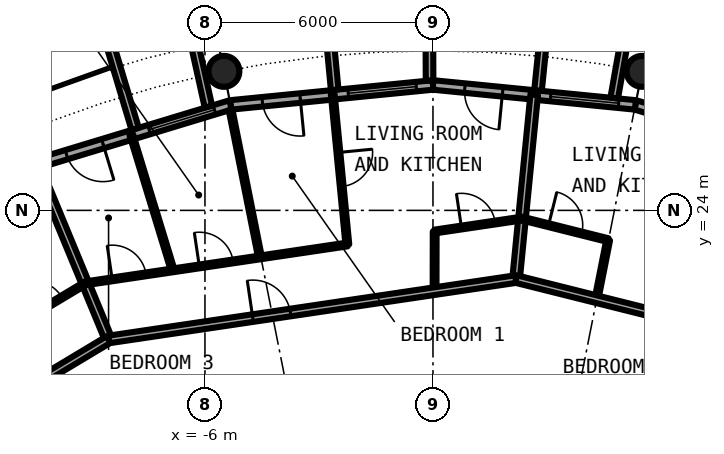
"""IFC4 building model, lengths in metres.
Left out: names, types, materials, properties, quantities, classifications, styles, units other than length and angle.
Written with IfcOpenShell. Run it as: python <this file> out.ifc"""

import sys

from ifc_helpers import new_model, si_unit, direction, frame, frame_2d, origin, origin_2d, place, context, subcontext, project, spatial, rectangle, hollow_circle, extrude, element, fill, save


model = new_model("IFC4")
c1 = context("Model", 3, precision=1e-05, world=origin(), true_north=direction((0.0, 1.0)))
c2 = subcontext(c1, "Body", "Model", "MODEL_VIEW")
j1 = project(units=[si_unit("LENGTHUNIT", "METRE"), si_unit("PLANEANGLEUNIT", "RADIAN")], contexts=[c1])
p1 = place(None, origin())
s1 = spatial("IfcSite", under=j1, at=p1, CompositionType="ELEMENT")
p2 = place(p1, origin())
s2 = spatial("IfcBuilding", under=s1, at=p2, CompositionType="ELEMENT")
p3 = place(p2, frame((0.0, 0.0, 145.2)))
s3 = spatial("IfcBuildingStorey", under=s2, at=p3, CompositionType="ELEMENT", Elevation=145.2)
for number, where, z_axis, x_axis in (
    (1, (5.501, 27.658, 0.0), (0.0, 0.0, 1.0), (1.0, 0.0, 0.0)),
    (2, (-5.501, 27.658, 0.0), (0.0, 0.0, 1.0), (1.0, 0.0, 0.0)),
):
    element("IfcColumn", number, at=place(p3, frame(where, z_axis=z_axis, x_axis=x_axis)), inside=s3, PredefinedType="COLUMN", context=c2, shape_type="SweptSolid", body=[
        extrude(hollow_circle(Radius=0.406, WallThickness=0.04, at=origin_2d()), origin(), (0.0, 0.0, 1.0), 3.05),
    ])
p4 = place(p3, frame((10.447, 25.222, 0.0), z_axis=(0.0, 0.0, 1.0), x_axis=(-0.956965678721, 0.290201119486, 0.0)))
e3 = element("IfcWall", 3, at=p4, inside=s3, PredefinedType="SOLIDWALL", context=c2, shape_type="SweptSolid", body=[
    extrude(rectangle(XDim=5.351, YDim=0.25, at=frame_2d((2.676, 0.0))), origin(), (0.0, 0.0, 1.0), 2.7),
])
p5 = place(p4, frame((0.441, 0.0, 0.3)))
e4 = element("IfcOpeningElement", 4, at=p5, cuts=e3, PredefinedType="OPENING", context=c2, shape_type="SweptSolid", body=[
    extrude(rectangle(XDim=1.8, YDim=2.1, at=frame_2d((0.9, 1.05))), frame((0.0, 0.135, 0.0), z_axis=(0.0, -1.0, 0.0), x_axis=(1.0, 0.0, 0.0)), (0.0, 0.0, 1.0), 0.27),
])
p6 = place(p4, frame((3.51, 0.0, 0.0)))
e5 = element("IfcOpeningElement", 5, at=p6, cuts=e3, PredefinedType="OPENING", context=c2, shape_type="SweptSolid", body=[
    extrude(rectangle(XDim=1.0, YDim=2.2, at=frame_2d((0.5, 1.1))), frame((0.0, 0.135, 0.0), z_axis=(0.0, -1.0, 0.0), x_axis=(1.0, 0.0, 0.0)), (0.0, 0.0, 1.0), 0.27),
])
p7 = place(p3, frame((5.326, 26.775, 0.0), z_axis=(0.0, 0.0, 1.0), x_axis=(-0.995173996315, 0.098126026407, 0.0)))
e6 = element("IfcWall", 6, at=p7, inside=s3, PredefinedType="SOLIDWALL", context=c2, shape_type="SweptSolid", body=[
    extrude(rectangle(XDim=5.352, YDim=0.25, at=frame_2d((2.676, 0.0))), origin(), (0.0, 0.0, 1.0), 2.7),
])
p8 = place(p7, frame((0.441, 0.0, 0.3)))
e7 = element("IfcOpeningElement", 7, at=p8, cuts=e6, PredefinedType="OPENING", context=c2, shape_type="SweptSolid", body=[
    extrude(rectangle(XDim=1.8, YDim=2.1, at=frame_2d((0.9, 1.05))), frame((0.0, 0.135, 0.0), z_axis=(0.0, -1.0, 0.0), x_axis=(1.0, 0.0, 0.0)), (0.0, 0.0, 1.0), 0.27),
])
p9 = place(p7, frame((3.51, 0.0, 0.0)))
e8 = element("IfcOpeningElement", 8, at=p9, cuts=e6, PredefinedType="OPENING", context=c2, shape_type="SweptSolid", body=[
    extrude(rectangle(XDim=1.0, YDim=2.2, at=frame_2d((0.5, 1.1))), frame((0.0, 0.135, 0.0), z_axis=(0.0, -1.0, 0.0), x_axis=(1.0, 0.0, 0.0)), (0.0, 0.0, 1.0), 0.27),
])
p10 = place(p3, frame((4.769, 26.956, -0.03), z_axis=(0.0, 0.0, 1.0), x_axis=(0.174056778901, 0.984735618183, 0.0)))
e9 = element("IfcWall", 9, at=p10, inside=s3, PredefinedType="SOLIDWALL", context=c2, shape_type="SweptSolid", body=[
    extrude(rectangle(XDim=2.925, YDim=0.2, at=frame_2d((1.462, 0.0))), origin(), (0.0, 0.0, 1.0), 2.73),
])
p11 = place(p3, frame((2.764, 27.153, -0.03), z_axis=(0.0, 0.0, 1.0), x_axis=(0.101505487237, 0.994834979311, 0.0)))
e10 = element("IfcWall", 10, at=p11, inside=s3, PredefinedType="SOLIDWALL", context=c2, shape_type="SweptSolid", body=[
    extrude(rectangle(XDim=3.007, YDim=0.2, at=frame_2d((1.503, 0.0))), origin(), (0.0, 0.0, 1.0), 2.73),
])
p12 = place(p3, frame((0.0, 27.3, 0.0), z_axis=(0.0, 0.0, 1.0), x_axis=(-0.995173996315, -0.098126026407, 0.0)))
e11 = element("IfcWall", 11, at=p12, inside=s3, PredefinedType="SOLIDWALL", context=c2, shape_type="SweptSolid", body=[
    extrude(rectangle(XDim=5.352, YDim=0.25, at=frame_2d((2.676, 0.0))), origin(), (0.0, 0.0, 1.0), 2.7),
])
p13 = place(p12, frame((0.441, 0.0, 0.3)))
e12 = element("IfcOpeningElement", 12, at=p13, cuts=e11, PredefinedType="OPENING", context=c2, shape_type="SweptSolid", body=[
    extrude(rectangle(XDim=1.8, YDim=2.1, at=frame_2d((0.9, 1.05))), frame((0.0, 0.135, 0.0), z_axis=(0.0, -1.0, 0.0), x_axis=(1.0, 0.0, 0.0)), (0.0, 0.0, 1.0), 0.27),
])
p14 = place(p12, frame((3.51, 0.0, 0.0)))
e13 = element("IfcOpeningElement", 13, at=p14, cuts=e11, PredefinedType="OPENING", context=c2, shape_type="SweptSolid", body=[
    extrude(rectangle(XDim=1.0, YDim=2.2, at=frame_2d((0.5, 1.1))), frame((0.0, 0.135, 0.0), z_axis=(0.0, -1.0, 0.0), x_axis=(1.0, 0.0, 0.0)), (0.0, 0.0, 1.0), 0.27),
])
p15 = place(p3, frame((-0.09, 27.417, -0.03), z_axis=(0.0, 0.0, 1.0), x_axis=(-0.00347308367, 0.999993968827, 0.0)))
e14 = element("IfcWall", 14, at=p15, inside=s3, PredefinedType="SOLIDWALL", context=c2, shape_type="SweptSolid", body=[
    extrude(rectangle(XDim=2.882, YDim=0.2, at=frame_2d((1.441, 0.0))), origin(), (0.0, 0.0, 1.0), 2.73),
])
p16 = place(p3, frame((-2.586, 27.171, -0.03), z_axis=(0.0, 0.0, 1.0), x_axis=(-0.094548432284, 0.995520262954, 0.0)))
e15 = element("IfcWall", 15, at=p16, inside=s3, PredefinedType="SOLIDWALL", context=c2, shape_type="SweptSolid", body=[
    extrude(rectangle(XDim=3.006, YDim=0.2, at=frame_2d((1.503, 0.0))), origin(), (0.0, 0.0, 1.0), 2.73),
])
p17 = place(p3, frame((-5.326, 26.775, 0.0), z_axis=(0.0, 0.0, 1.0), x_axis=(-0.956965678721, -0.290201119486, 0.0)))
e16 = element("IfcWall", 16, at=p17, inside=s3, PredefinedType="SOLIDWALL", context=c2, shape_type="SweptSolid", body=[
    extrude(rectangle(XDim=5.351, YDim=0.25, at=frame_2d((2.676, 0.0))), origin(), (0.0, 0.0, 1.0), 2.7),
])
p18 = place(p17, frame((0.441, 0.0, 0.3)))
e17 = element("IfcOpeningElement", 17, at=p18, cuts=e16, PredefinedType="OPENING", context=c2, shape_type="SweptSolid", body=[
    extrude(rectangle(XDim=1.8, YDim=2.1, at=frame_2d((0.9, 1.05))), frame((0.0, 0.135, 0.0), z_axis=(0.0, -1.0, 0.0), x_axis=(1.0, 0.0, 0.0)), (0.0, 0.0, 1.0), 0.27),
])
p19 = place(p17, frame((3.51, 0.0, 0.0)))
e18 = element("IfcOpeningElement", 18, at=p19, cuts=e16, PredefinedType="OPENING", context=c2, shape_type="SweptSolid", body=[
    extrude(rectangle(XDim=1.0, YDim=2.2, at=frame_2d((0.5, 1.1))), frame((0.0, 0.135, 0.0), z_axis=(0.0, -1.0, 0.0), x_axis=(1.0, 0.0, 0.0)), (0.0, 0.0, 1.0), 0.27),
])
p20 = place(p3, frame((-5.909, 26.729, -0.03), z_axis=(0.0, 0.0, 1.0), x_axis=(-0.216409053917, 0.976302781612, 0.0)))
e19 = element("IfcWall", 19, at=p20, inside=s3, PredefinedType="SOLIDWALL", context=c2, shape_type="SweptSolid", body=[
    extrude(rectangle(XDim=2.925, YDim=0.2, at=frame_2d((1.463, 0.0))), origin(), (0.0, 0.0, 1.0), 2.73),
])
p21 = place(p3, frame((-7.837, 26.144, -0.03), z_axis=(0.0, 0.0, 1.0), x_axis=(-0.287064767992, 0.957911174889, 0.0)))
e20 = element("IfcWall", 20, at=p21, inside=s3, PredefinedType="SOLIDWALL", context=c2, shape_type="SweptSolid", body=[
    extrude(rectangle(XDim=3.006, YDim=0.2, at=frame_2d((1.503, 0.0))), origin(), (0.0, 0.0, 1.0), 2.73),
])
p22 = place(p3, frame((-5.327, 26.648, 0.0), z_axis=(0.0, 0.0, 1.0), x_axis=(0.195796227202, -0.980644603011, 0.0)))
e21 = element("IfcWall", 21, at=p22, inside=s3, PredefinedType="PARTITIONING", context=c2, shape_type="SweptSolid", body=[
    extrude(rectangle(XDim=3.963, YDim=0.1, at=frame_2d((1.981, 0.0))), origin(), (0.0, 0.0, 1.0), 2.7),
])
p23 = place(p3, frame((4.302, 21.663, 0.0), z_axis=(0.0, 0.0, 1.0), x_axis=(0.194485862594, 0.980905321247, 0.0)))
e22 = element("IfcWall", 22, at=p23, inside=s3, PredefinedType="PARTITIONING", context=c2, shape_type="SweptSolid", body=[
    extrude(rectangle(XDim=1.584, YDim=0.1, at=frame_2d((0.792, 0.0))), origin(), (0.0, 0.0, 1.0), 2.7),
])
p24 = place(p3, frame((-10.4, 25.105, 0.0), z_axis=(0.0, 0.0, 1.0), x_axis=(0.382722001241, -0.923863555817, 0.0)))
e23 = element("IfcWall", 23, at=p24, inside=s3, PredefinedType="PARTITIONING", context=c2, shape_type="SweptSolid", body=[
    extrude(rectangle(XDim=4.873, YDim=0.2, at=frame_2d((2.437, 0.0))), origin(), (0.0, 0.0, 1.0), 2.7),
])
p25 = place(p3, frame((-7.938, 25.99, 0.0), z_axis=(0.0, 0.0, 1.0), x_axis=(0.292195259296, -0.956358682945, 0.0)))
e24 = element("IfcWall", 24, at=p25, inside=s3, PredefinedType="PARTITIONING", context=c2, shape_type="SweptSolid", body=[
    extrude(rectangle(XDim=3.731, YDim=0.1, at=frame_2d((1.865, 0.0))), origin(), (0.0, 0.0, 1.0), 2.7),
])
p26 = place(p3, frame((-2.637, 27.047, 0.0), z_axis=(0.0, 0.0, 1.0), x_axis=(0.096910924258, -0.995293058732, 0.0)))
e25 = element("IfcWall", 25, at=p26, inside=s3, PredefinedType="PARTITIONING", context=c2, shape_type="SweptSolid", body=[
    extrude(rectangle(XDim=3.963, YDim=0.1, at=frame_2d((1.981, 0.0))), origin(), (0.0, 0.0, 1.0), 2.7),
])
p27 = place(p26, frame((1.531, 0.0, 0.0)))
e26 = element("IfcOpeningElement", 26, at=p27, cuts=e25, PredefinedType="OPENING", context=c2, shape_type="SweptSolid", body=[
    extrude(rectangle(XDim=0.9, YDim=2.3, at=frame_2d((0.45, 1.15))), frame((0.0, 0.06, 0.0), z_axis=(0.0, -1.0, 0.0), x_axis=(1.0, 0.0, 0.0)), (0.0, 0.0, 1.0), 0.12),
])
p28 = place(p3, frame((0.042, 21.875, 0.0), z_axis=(0.0, 0.0, 1.0), x_axis=(0.00186711982, 0.99999825693, 0.0)))
e27 = element("IfcWall", 27, at=p28, inside=s3, PredefinedType="PARTITIONING", context=c2, shape_type="SweptSolid", body=[
    extrude(rectangle(XDim=1.569, YDim=0.1, at=frame_2d((0.785, 0.0))), origin(), (0.0, 0.0, 1.0), 2.7),
])
p29 = place(p3, frame((2.186, 22.193, 0.0), z_axis=(0.0, 0.0, 1.0), x_axis=(0.098070432075, 0.995179476453, 0.0)))
e28 = element("IfcWall", 28, at=p29, inside=s3, PredefinedType="PARTITIONING", context=c2, shape_type="SweptSolid", body=[
    extrude(rectangle(XDim=4.874, YDim=0.2, at=frame_2d((2.437, 0.0))), origin(), (0.0, 0.0, 1.0), 2.7),
])
p30 = place(p3, frame((-8.534, 20.603, 0.0), z_axis=(0.0, 0.0, 1.0), x_axis=(0.989177441421, 0.146724194948, 0.0)))
e29 = element("IfcWall", 29, at=p30, inside=s3, PredefinedType="PARTITIONING", context=c2, shape_type="SweptSolid", body=[
    extrude(rectangle(XDim=10.837, YDim=0.2, at=frame_2d((5.418, 0.0))), origin(), (0.0, 0.0, 1.0), 2.7),
])
p31 = place(p30, frame((3.835, 0.0, 0.0)))
e30 = element("IfcOpeningElement", 30, at=p31, cuts=e29, PredefinedType="OPENING", context=c2, shape_type="SweptSolid", body=[
    extrude(rectangle(XDim=1.0, YDim=2.3, at=frame_2d((0.5, 1.15))), frame((0.0, 0.11, 0.0), z_axis=(0.0, -1.0, 0.0), x_axis=(1.0, 0.0, 0.0)), (0.0, 0.0, 1.0), 0.22),
])
p32 = place(p3, frame((-14.15, 17.235, 0.0), z_axis=(0.0, 0.0, 1.0), x_axis=(0.857604752351, 0.514309331769, 0.0)))
e31 = element("IfcWall", 31, at=p32, inside=s3, PredefinedType="PARTITIONING", context=c2, shape_type="SweptSolid", body=[
    extrude(rectangle(XDim=6.548, YDim=0.2, at=frame_2d((3.274, 0.0))), origin(), (0.0, 0.0, 1.0), 2.7),
])
p33 = place(p32, frame((1.685, 0.0, 0.0)))
e32 = element("IfcOpeningElement", 32, at=p33, cuts=e31, PredefinedType="OPENING", context=c2, shape_type="SweptSolid", body=[
    extrude(rectangle(XDim=1.0, YDim=2.3, at=frame_2d((0.5, 1.15))), frame((0.0, 0.11, 0.0), z_axis=(0.0, -1.0, 0.0), x_axis=(1.0, 0.0, 0.0)), (0.0, 0.0, 1.0), 0.22),
])
p34 = place(p3, frame((2.186, 22.193, 0.0), z_axis=(0.0, 0.0, 1.0), x_axis=(0.97003047456, -0.242983288366, 0.0)))
e33 = element("IfcWall", 33, at=p34, inside=s3, PredefinedType="PARTITIONING", context=c2, shape_type="SweptSolid", body=[
    extrude(rectangle(XDim=6.544, YDim=0.2, at=frame_2d((3.272, 0.0))), origin(), (0.0, 0.0, 1.0), 2.7),
])
p35 = place(p34, frame((3.863, 0.0, 0.0)))
e34 = element("IfcOpeningElement", 34, at=p35, cuts=e33, PredefinedType="OPENING", context=c2, shape_type="SweptSolid", body=[
    extrude(rectangle(XDim=1.0, YDim=2.3, at=frame_2d((0.5, 1.15))), frame((0.0, 0.11, 0.0), z_axis=(0.0, -1.0, 0.0), x_axis=(1.0, 0.0, 0.0)), (0.0, 0.0, 1.0), 0.22),
])
p36 = place(p3, frame((-9.149, 22.08, 0.0), z_axis=(0.0, 0.0, 1.0), x_axis=(0.989175993049, 0.146733959176, 0.0)))
e35 = element("IfcWall", 35, at=p36, inside=s3, PredefinedType="PARTITIONING", context=c2, shape_type="SweptSolid", body=[
    extrude(rectangle(XDim=6.971, YDim=0.1, at=frame_2d((3.486, 0.0))), origin(), (0.0, 0.0, 1.0), 2.7),
])
p37 = place(p36, frame((3.034, 0.0, 0.0)))
e36 = element("IfcOpeningElement", 36, at=p37, cuts=e35, PredefinedType="OPENING", context=c2, shape_type="SweptSolid", body=[
    extrude(rectangle(XDim=0.9, YDim=2.3, at=frame_2d((0.45, 1.15))), frame((0.0, 0.06, 0.0), z_axis=(0.0, -1.0, 0.0), x_axis=(1.0, 0.0, 0.0)), (0.0, 0.0, 1.0), 0.12),
])
p38 = place(p36, frame((0.716, 0.0, 0.0)))
e37 = element("IfcOpeningElement", 37, at=p38, cuts=e35, PredefinedType="OPENING", context=c2, shape_type="SweptSolid", body=[
    extrude(rectangle(XDim=0.9, YDim=2.3, at=frame_2d((0.45, 1.15))), frame((0.0, 0.06, 0.0), z_axis=(0.0, -1.0, 0.0), x_axis=(1.0, 0.0, 0.0)), (0.0, 0.0, 1.0), 0.12),
])
p39 = place(p3, frame((0.045, 23.444, 0.0), z_axis=(0.0, 0.0, 1.0), x_axis=(0.989180881673, 0.146700999768, 0.0)))
e38 = element("IfcWall", 38, at=p39, inside=s3, PredefinedType="PARTITIONING", context=c2, shape_type="SweptSolid", body=[
    extrude(rectangle(XDim=2.323, YDim=0.1, at=frame_2d((1.162, 0.0))), origin(), (0.0, 0.0, 1.0), 2.7),
])
p40 = place(p39, frame((0.712, 0.0, 0.0)))
e39 = element("IfcOpeningElement", 39, at=p40, cuts=e38, PredefinedType="OPENING", context=c2, shape_type="SweptSolid", body=[
    extrude(rectangle(XDim=0.9, YDim=2.3, at=frame_2d((0.45, 1.15))), frame((0.0, 0.06, 0.0), z_axis=(0.0, -1.0, 0.0), x_axis=(1.0, 0.0, 0.0)), (0.0, 0.0, 1.0), 0.12),
])
p41 = place(p3, frame((-11.151, 20.879, 0.0), z_axis=(0.0, 0.0, 1.0), x_axis=(0.857640331606, 0.514249999127, 0.0)))
e40 = element("IfcWall", 40, at=p41, inside=s3, PredefinedType="PARTITIONING", context=c2, shape_type="SweptSolid", body=[
    extrude(rectangle(XDim=2.338, YDim=0.1, at=frame_2d((1.169, 0.0))), origin(), (0.0, 0.0, 1.0), 2.7),
])
p42 = place(p41, frame((0.719, 0.0, 0.0)))
e41 = element("IfcOpeningElement", 41, at=p42, cuts=e40, PredefinedType="OPENING", context=c2, shape_type="SweptSolid", body=[
    extrude(rectangle(XDim=0.9, YDim=2.3, at=frame_2d((0.45, 1.15))), frame((0.0, 0.06, 0.0), z_axis=(0.0, -1.0, 0.0), x_axis=(1.0, 0.0, 0.0)), (0.0, 0.0, 1.0), 0.12),
])
p43 = place(p3, frame((2.343, 23.785, 0.0), z_axis=(0.0, 0.0, 1.0), x_axis=(0.970031792706, -0.242978026043, 0.0)))
e42 = element("IfcWall", 42, at=p43, inside=s3, PredefinedType="PARTITIONING", context=c2, shape_type="SweptSolid", body=[
    extrude(rectangle(XDim=2.337, YDim=0.1, at=frame_2d((1.168, 0.0))), origin(), (0.0, 0.0, 1.0), 2.7),
])
p44 = place(p43, frame((0.719, 0.0, 0.0)))
e43 = element("IfcOpeningElement", 43, at=p44, cuts=e42, PredefinedType="OPENING", context=c2, shape_type="SweptSolid", body=[
    extrude(rectangle(XDim=0.9, YDim=2.3, at=frame_2d((0.45, 1.15))), frame((0.0, 0.06, 0.0), z_axis=(0.0, -1.0, 0.0), x_axis=(1.0, 0.0, 0.0)), (0.0, 0.0, 1.0), 0.12),
])
p45 = place(p8, origin())
e44 = element("IfcWindow", 44, at=p45, inside=s3, PartitioningType="SINGLE_PANEL", PredefinedType="WINDOW", context=c2, shape_type="SweptSolid", body=[
    extrude(rectangle(XDim=1.8, YDim=2.1, at=frame_2d((0.9, 1.05))), frame((0.0, 0.03, 0.0), z_axis=(0.0, -1.0, 0.0), x_axis=(1.0, 0.0, 0.0)), (0.0, 0.0, 1.0), 0.06),
])
fill(e7, e44)
p46 = place(p9, origin())
e45 = element("IfcDoor", 45, at=p46, inside=s3, OperationType="SINGLE_SWING_LEFT", PredefinedType="DOOR", context=c2, shape_type="SweptSolid", body=[
    extrude(rectangle(XDim=1.0, YDim=2.2, at=frame_2d((0.5, 1.1))), frame((0.0, 0.025, 0.0), z_axis=(0.0, -1.0, 0.0), x_axis=(1.0, 0.0, 0.0)), (0.0, 0.0, 1.0), 0.05),
])
fill(e8, e45)
p47 = place(p13, origin())
e46 = element("IfcWindow", 46, at=p47, inside=s3, PartitioningType="SINGLE_PANEL", PredefinedType="WINDOW", context=c2, shape_type="SweptSolid", body=[
    extrude(rectangle(XDim=1.8, YDim=2.1, at=frame_2d((0.9, 1.05))), frame((0.0, 0.03, 0.0), z_axis=(0.0, -1.0, 0.0), x_axis=(1.0, 0.0, 0.0)), (0.0, 0.0, 1.0), 0.06),
])
fill(e12, e46)
p48 = place(p14, origin())
e47 = element("IfcDoor", 47, at=p48, inside=s3, OperationType="SINGLE_SWING_LEFT", PredefinedType="DOOR", context=c2, shape_type="SweptSolid", body=[
    extrude(rectangle(XDim=1.0, YDim=2.2, at=frame_2d((0.5, 1.1))), frame((0.0, 0.025, 0.0), z_axis=(0.0, -1.0, 0.0), x_axis=(1.0, 0.0, 0.0)), (0.0, 0.0, 1.0), 0.05),
])
fill(e13, e47)
p49 = place(p18, origin())
e48 = element("IfcWindow", 48, at=p49, inside=s3, PartitioningType="SINGLE_PANEL", PredefinedType="WINDOW", context=c2, shape_type="SweptSolid", body=[
    extrude(rectangle(XDim=1.8, YDim=2.1, at=frame_2d((0.9, 1.05))), frame((0.0, 0.03, 0.0), z_axis=(0.0, -1.0, 0.0), x_axis=(1.0, 0.0, 0.0)), (0.0, 0.0, 1.0), 0.06),
])
fill(e17, e48)
p50 = place(p19, origin())
e49 = element("IfcDoor", 49, at=p50, inside=s3, OperationType="SINGLE_SWING_LEFT", PredefinedType="DOOR", context=c2, shape_type="SweptSolid", body=[
    extrude(rectangle(XDim=1.0, YDim=2.2, at=frame_2d((0.5, 1.1))), frame((0.0, 0.025, 0.0), z_axis=(0.0, -1.0, 0.0), x_axis=(1.0, 0.0, 0.0)), (0.0, 0.0, 1.0), 0.05),
])
fill(e18, e49)
p51 = place(p44, origin())
e50 = element("IfcDoor", 50, at=p51, inside=s3, OperationType="SINGLE_SWING_RIGHT", PredefinedType="DOOR", context=c2, shape_type="SweptSolid", body=[
    extrude(rectangle(XDim=0.9, YDim=2.3, at=frame_2d((0.45, 1.15))), frame((0.0, 0.025, 0.0), z_axis=(0.0, -1.0, 0.0), x_axis=(1.0, 0.0, 0.0)), (0.0, 0.0, 1.0), 0.05),
])
fill(e43, e50)
p52 = place(p31, origin())
e51 = element("IfcDoor", 51, at=p52, inside=s3, OperationType="SINGLE_SWING_LEFT", PredefinedType="DOOR", context=c2, shape_type="SweptSolid", body=[
    extrude(rectangle(XDim=1.0, YDim=2.3, at=frame_2d((0.5, 1.15))), frame((0.0, 0.025, 0.0), z_axis=(0.0, -1.0, 0.0), x_axis=(1.0, 0.0, 0.0)), (0.0, 0.0, 1.0), 0.05),
])
fill(e30, e51)
p53 = place(p40, origin())
e52 = element("IfcDoor", 52, at=p53, inside=s3, OperationType="SINGLE_SWING_LEFT", PredefinedType="DOOR", context=c2, shape_type="SweptSolid", body=[
    extrude(rectangle(XDim=0.9, YDim=2.3, at=frame_2d((0.45, 1.15))), frame((0.0, 0.025, 0.0), z_axis=(0.0, -1.0, 0.0), x_axis=(1.0, 0.0, 0.0)), (0.0, 0.0, 1.0), 0.05),
])
fill(e39, e52)
p54 = place(p27, origin())
e53 = element("IfcDoor", 53, at=p54, inside=s3, OperationType="SINGLE_SWING_RIGHT", PredefinedType="DOOR", context=c2, shape_type="SweptSolid", body=[
    extrude(rectangle(XDim=0.9, YDim=2.3, at=frame_2d((0.45, 1.15))), frame((0.0, 0.025, 0.0), z_axis=(0.0, -1.0, 0.0), x_axis=(1.0, 0.0, 0.0)), (0.0, 0.0, 1.0), 0.05),
])
fill(e26, e53)
p55 = place(p37, origin())
e54 = element("IfcDoor", 54, at=p55, inside=s3, OperationType="SINGLE_SWING_LEFT", PredefinedType="DOOR", context=c2, shape_type="SweptSolid", body=[
    extrude(rectangle(XDim=0.9, YDim=2.3, at=frame_2d((0.45, 1.15))), frame((0.0, 0.025, 0.0), z_axis=(0.0, -1.0, 0.0), x_axis=(1.0, 0.0, 0.0)), (0.0, 0.0, 1.0), 0.05),
])
fill(e36, e54)
p56 = place(p38, origin())
e55 = element("IfcDoor", 55, at=p56, inside=s3, OperationType="SINGLE_SWING_LEFT", PredefinedType="DOOR", context=c2, shape_type="SweptSolid", body=[
    extrude(rectangle(XDim=0.9, YDim=2.3, at=frame_2d((0.45, 1.15))), frame((0.0, 0.025, 0.0), z_axis=(0.0, -1.0, 0.0), x_axis=(1.0, 0.0, 0.0)), (0.0, 0.0, 1.0), 0.05),
])
fill(e37, e55)
p57 = place(p42, origin())
e56 = element("IfcDoor", 56, at=p57, inside=s3, OperationType="SINGLE_SWING_RIGHT", PredefinedType="DOOR", context=c2, shape_type="SweptSolid", body=[
    extrude(rectangle(XDim=0.9, YDim=2.3, at=frame_2d((0.45, 1.15))), frame((0.0, 0.025, 0.0), z_axis=(0.0, -1.0, 0.0), x_axis=(1.0, 0.0, 0.0)), (0.0, 0.0, 1.0), 0.05),
])
fill(e41, e56)
save(model, sys.argv[1])
